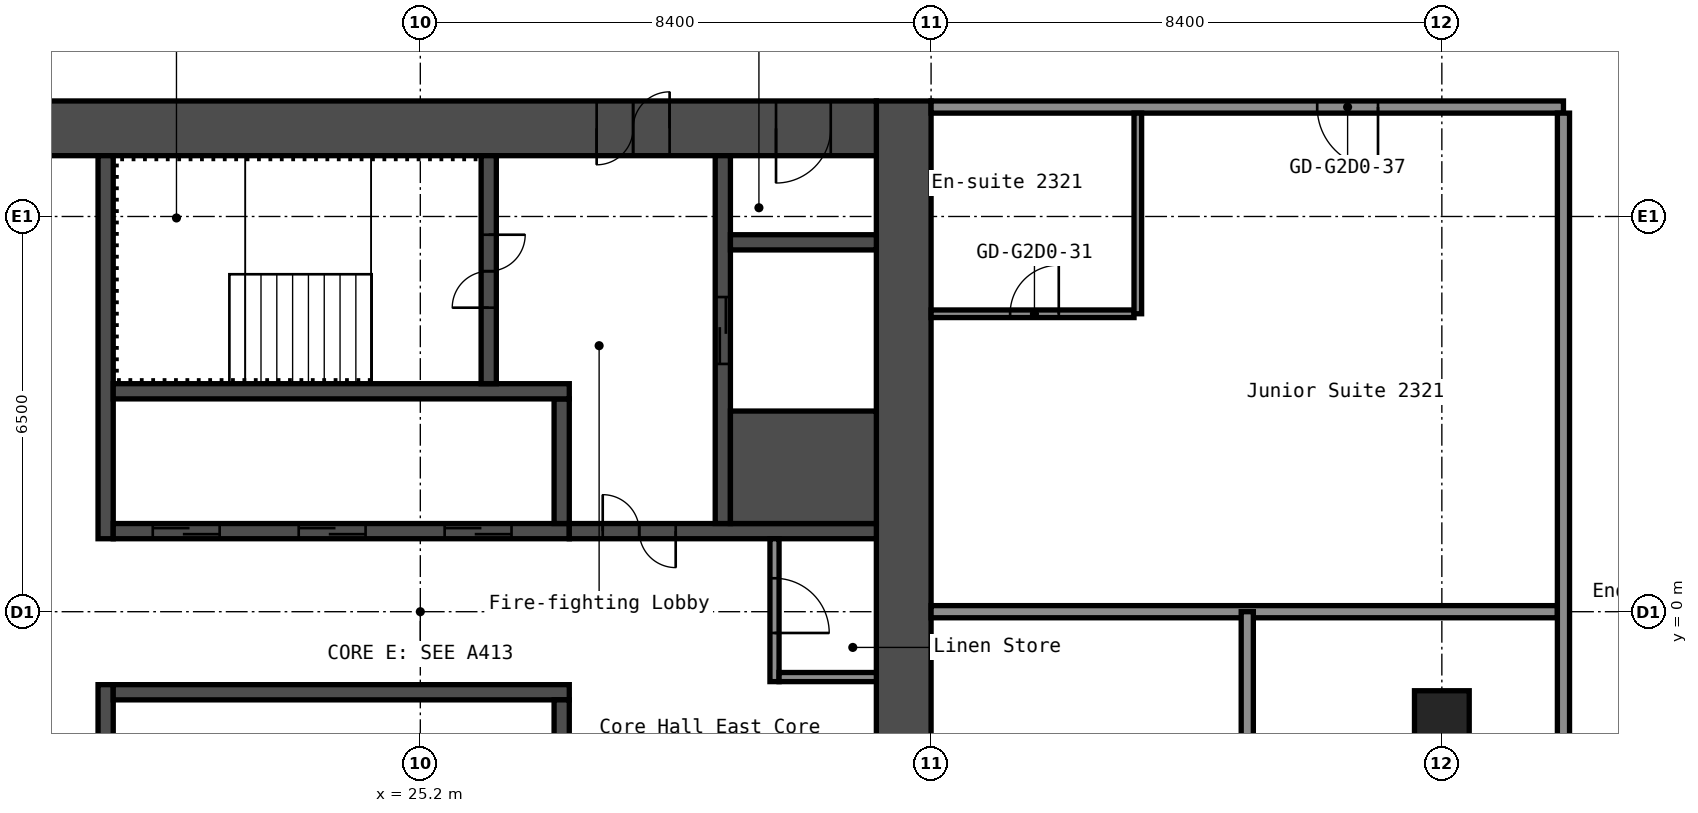
"""IFC4 building model, lengths in metres.
Left out: names, types, materials, properties, quantities, classifications, styles, units other than length and angle.
Written with IfcOpenShell. Run it as: python <this file> out.ifc"""

import sys

from ifc_helpers import new_model, si_unit, direction, frame, frame_2d, origin, origin_2d, place, context, subcontext, project, spatial, rectangle, hollow_rectangle, extrude, element, fill, save


model = new_model("IFC4")
c1 = context("Model", 3, precision=1e-05, world=origin(), true_north=direction((0.0, 1.0)))
c2 = subcontext(c1, "Body", "Model", "MODEL_VIEW")
j1 = project(units=[si_unit("LENGTHUNIT", "METRE"), si_unit("PLANEANGLEUNIT", "RADIAN")], contexts=[c1])
p1 = place(None, origin())
s1 = spatial("IfcSite", under=j1, at=p1, CompositionType="ELEMENT")
p2 = place(p1, origin())
s2 = spatial("IfcBuilding", under=s1, at=p2, CompositionType="ELEMENT")
p3 = place(p2, frame((0.0, 0.0, 85.0)))
s3 = spatial("IfcBuildingStorey", under=s2, at=p3, CompositionType="ELEMENT", Elevation=85.0)
p4 = place(p3, frame((42.0, -1.75, 0.0), z_axis=(0.0, 0.0, 1.0), x_axis=(1.0, 0.0, 0.0)))
e1 = element("IfcColumn", 1, at=p4, inside=s3, PredefinedType="COLUMN", context=c2, shape_type="SweptSolid", body=[
    extrude(hollow_rectangle(XDim=0.9, YDim=0.9, WallThickness=0.036, at=origin_2d()), origin(), (0.0, 0.0, 1.0), 2.8),
])
p5 = place(p3, frame((33.15, -8.4, 0.0), z_axis=(0.0, 0.0, 1.0), x_axis=(0.0, 1.0, 0.0)))
e2 = element("IfcWall", 2, at=p5, inside=s3, PredefinedType="SHEAR", context=c2, shape_type="SweptSolid", body=[
    extrude(rectangle(XDim=16.8, YDim=0.9, at=frame_2d((8.4, 0.0))), origin(), (0.0, 0.0, 1.0), 2.8),
])
p6 = place(p3, frame((17.7, 7.95, 0.0), z_axis=(0.0, 0.0, 1.0), x_axis=(1.0, 0.0, 0.0)))
e3 = element("IfcWall", 3, at=p6, inside=s3, PredefinedType="SHEAR", context=c2, shape_type="SweptSolid", body=[
    extrude(rectangle(XDim=15.0, YDim=0.9, at=frame_2d((7.5, 0.0))), origin(), (0.0, 0.0, 1.0), 2.8),
])
p7 = place(p6, frame((10.4, 0.0, 0.0)))
e4 = element("IfcOpeningElement", 4, at=p7, cuts=e3, PredefinedType="OPENING", context=c2, shape_type="SweptSolid", body=[
    extrude(rectangle(XDim=1.2, YDim=2.1, at=frame_2d((0.6, 1.05))), frame((0.0, 0.46, 0.0), z_axis=(0.0, -1.0, 0.0), x_axis=(1.0, 0.0, 0.0)), (0.0, 0.0, 1.0), 0.92),
])
p8 = place(p6, frame((13.35, 0.0, 0.0)))
e5 = element("IfcOpeningElement", 5, at=p8, cuts=e3, PredefinedType="OPENING", context=c2, shape_type="SweptSolid", body=[
    extrude(rectangle(XDim=0.9, YDim=2.1, at=frame_2d((0.45, 1.05))), frame((0.0, 0.46, 0.0), z_axis=(0.0, -1.0, 0.0), x_axis=(1.0, 0.0, 0.0)), (0.0, 0.0, 1.0), 0.92),
])
p9 = place(p3, frame((20.025, 1.2, 0.0), z_axis=(0.0, 0.0, 1.0), x_axis=(0.0, 1.0, 0.0)))
e6 = element("IfcWall", 6, at=p9, inside=s3, PredefinedType="SHEAR", context=c2, shape_type="SweptSolid", body=[
    extrude(rectangle(XDim=6.3, YDim=0.25, at=frame_2d((3.15, 0.0))), origin(), (0.0, 0.0, 1.0), 2.8),
])
p10 = place(p3, frame((20.025, -7.5, 0.0), z_axis=(0.0, 0.0, 1.0), x_axis=(0.0, 1.0, 0.0)))
e7 = element("IfcWall", 7, at=p10, inside=s3, PredefinedType="SHEAR", context=c2, shape_type="SweptSolid", body=[
    extrude(rectangle(XDim=6.3, YDim=0.25, at=frame_2d((3.15, 0.0))), origin(), (0.0, 0.0, 1.0), 2.8),
])
p11 = place(p10, frame((2.4, 0.0, 0.0)))
e8 = element("IfcOpeningElement", 8, at=p11, cuts=e7, PredefinedType="OPENING", context=c2, shape_type="SweptSolid", body=[
    extrude(rectangle(XDim=1.0, YDim=2.1, at=frame_2d((0.5, 1.05))), frame((0.0, 0.135, 0.0), z_axis=(0.0, -1.0, 0.0), x_axis=(1.0, 0.0, 0.0)), (0.0, 0.0, 1.0), 0.27),
])
p12 = place(p3, frame((20.15, 1.325, 0.0), z_axis=(0.0, 0.0, 1.0), x_axis=(1.0, 0.0, 0.0)))
e9 = element("IfcWall", 9, at=p12, inside=s3, PredefinedType="SHEAR", context=c2, shape_type="SweptSolid", body=[
    extrude(rectangle(XDim=7.5, YDim=0.25, at=frame_2d((3.75, 0.0))), origin(), (0.0, 0.0, 1.0), 2.8),
])
p13 = place(p12, frame((0.65, 0.0, 0.0)))
e10 = element("IfcOpeningElement", 10, at=p13, cuts=e9, PredefinedType="OPENING", context=c2, shape_type="SweptSolid", body=[
    extrude(rectangle(XDim=1.1, YDim=2.1, at=frame_2d((0.55, 1.05))), frame((0.0, 0.135, 0.0), z_axis=(0.0, -1.0, 0.0), x_axis=(1.0, 0.0, 0.0)), (0.0, 0.0, 1.0), 0.27),
])
p14 = place(p12, frame((3.05, 0.0, 0.0)))
e11 = element("IfcOpeningElement", 11, at=p14, cuts=e9, PredefinedType="OPENING", context=c2, shape_type="SweptSolid", body=[
    extrude(rectangle(XDim=1.1, YDim=2.1, at=frame_2d((0.55, 1.05))), frame((0.0, 0.135, 0.0), z_axis=(0.0, -1.0, 0.0), x_axis=(1.0, 0.0, 0.0)), (0.0, 0.0, 1.0), 0.27),
])
p15 = place(p12, frame((5.45, 0.0, 0.0)))
e12 = element("IfcOpeningElement", 12, at=p15, cuts=e9, PredefinedType="OPENING", context=c2, shape_type="SweptSolid", body=[
    extrude(rectangle(XDim=1.1, YDim=2.1, at=frame_2d((0.55, 1.05))), frame((0.0, 0.135, 0.0), z_axis=(0.0, -1.0, 0.0), x_axis=(1.0, 0.0, 0.0)), (0.0, 0.0, 1.0), 0.27),
])
p16 = place(p3, frame((27.525, 1.45, 0.0), z_axis=(0.0, 0.0, 1.0), x_axis=(0.0, 1.0, 0.0)))
e13 = element("IfcWall", 13, at=p16, inside=s3, PredefinedType="SHEAR", context=c2, shape_type="SweptSolid", body=[
    extrude(rectangle(XDim=2.05, YDim=0.25, at=frame_2d((1.025, 0.0))), origin(), (0.0, 0.0, 1.0), 2.8),
])
p17 = place(p3, frame((20.15, 3.625, 0.0), z_axis=(0.0, 0.0, 1.0), x_axis=(1.0, 0.0, 0.0)))
e14 = element("IfcWall", 14, at=p17, inside=s3, PredefinedType="SHEAR", context=c2, shape_type="SweptSolid", body=[
    extrude(rectangle(XDim=7.5, YDim=0.25, at=frame_2d((3.75, 0.0))), origin(), (0.0, 0.0, 1.0), 2.8),
])
p18 = place(p3, frame((26.325, 3.75, 0.0), z_axis=(0.0, 0.0, 1.0), x_axis=(0.0, 1.0, 0.0)))
e15 = element("IfcWall", 15, at=p18, inside=s3, PredefinedType="SHEAR", context=c2, shape_type="SweptSolid", body=[
    extrude(rectangle(XDim=3.75, YDim=0.25, at=frame_2d((1.875, 0.0))), origin(), (0.0, 0.0, 1.0), 2.8),
])
p19 = place(p18, frame((1.25, 0.0, 0.0)))
e16 = element("IfcOpeningElement", 16, at=p19, cuts=e15, PredefinedType="OPENING", context=c2, shape_type="SweptSolid", body=[
    extrude(rectangle(XDim=1.2, YDim=2.1, at=frame_2d((0.6, 1.05))), frame((0.0, 0.135, 0.0), z_axis=(0.0, -1.0, 0.0), x_axis=(1.0, 0.0, 0.0)), (0.0, 0.0, 1.0), 0.27),
])
p20 = place(p3, frame((27.65, 1.325, 0.0), z_axis=(0.0, 0.0, 1.0), x_axis=(1.0, 0.0, 0.0)))
e17 = element("IfcWall", 17, at=p20, inside=s3, PredefinedType="SHEAR", context=c2, shape_type="SweptSolid", body=[
    extrude(rectangle(XDim=5.05, YDim=0.25, at=frame_2d((2.525, 0.0))), origin(), (0.0, 0.0, 1.0), 2.8),
])
p21 = place(p20, frame((0.55, 0.0, 0.0)))
e18 = element("IfcOpeningElement", 18, at=p21, cuts=e17, PredefinedType="OPENING", context=c2, shape_type="SweptSolid", body=[
    extrude(rectangle(XDim=1.2, YDim=2.1, at=frame_2d((0.6, 1.05))), frame((0.0, 0.135, 0.0), z_axis=(0.0, -1.0, 0.0), x_axis=(1.0, 0.0, 0.0)), (0.0, 0.0, 1.0), 0.27),
])
p22 = place(p3, frame((30.175, 1.45, 0.0), z_axis=(0.0, 0.0, 1.0), x_axis=(0.0, 1.0, 0.0)))
e19 = element("IfcWall", 19, at=p22, inside=s3, PredefinedType="SHEAR", context=c2, shape_type="SweptSolid", body=[
    extrude(rectangle(XDim=6.05, YDim=0.25, at=frame_2d((3.025, 0.0))), origin(), (0.0, 0.0, 1.0), 2.8),
])
p23 = place(p22, frame((2.625, 0.0, 0.0)))
e20 = element("IfcOpeningElement", 20, at=p23, cuts=e19, PredefinedType="OPENING", context=c2, shape_type="SweptSolid", body=[
    extrude(rectangle(XDim=1.1, YDim=2.1, at=frame_2d((0.55, 1.05))), frame((0.0, 0.135, 0.0), z_axis=(0.0, -1.0, 0.0), x_axis=(1.0, 0.0, 0.0)), (0.0, 0.0, 1.0), 0.27),
])
p24 = place(p3, frame((30.3, 2.375, 0.0), z_axis=(0.0, 0.0, 1.0), x_axis=(1.0, 0.0, 0.0)))
e21 = element("IfcWall", 21, at=p24, inside=s3, PredefinedType="SHEAR", context=c2, shape_type="SweptSolid", body=[
    extrude(rectangle(XDim=2.4, YDim=1.85, at=frame_2d((1.2, 0.0))), origin(), (0.0, 0.0, 1.0), 2.8),
])
p25 = place(p3, frame((30.3, 6.075, 0.0), z_axis=(0.0, 0.0, 1.0), x_axis=(1.0, 0.0, 0.0)))
e22 = element("IfcWall", 22, at=p25, inside=s3, PredefinedType="SHEAR", context=c2, shape_type="SweptSolid", body=[
    extrude(rectangle(XDim=2.4, YDim=0.25, at=frame_2d((1.2, 0.0))), origin(), (0.0, 0.0, 1.0), 2.8),
])
p26 = place(p3, frame((20.15, -1.325, 0.0), z_axis=(0.0, 0.0, 1.0), x_axis=(1.0, 0.0, 0.0)))
e23 = element("IfcWall", 23, at=p26, inside=s3, PredefinedType="SHEAR", context=c2, shape_type="SweptSolid", body=[
    extrude(rectangle(XDim=7.5, YDim=0.25, at=frame_2d((3.75, 0.0))), origin(), (0.0, 0.0, 1.0), 2.8),
])
p27 = place(p3, frame((27.525, -3.5, 0.0), z_axis=(0.0, 0.0, 1.0), x_axis=(0.0, 1.0, 0.0)))
e24 = element("IfcWall", 24, at=p27, inside=s3, PredefinedType="SHEAR", context=c2, shape_type="SweptSolid", body=[
    extrude(rectangle(XDim=2.05, YDim=0.25, at=frame_2d((1.025, 0.0))), origin(), (0.0, 0.0, 1.0), 2.8),
])
p28 = place(p3, frame((31.025, -1.15, 0.0), z_axis=(0.0, 0.0, 1.0), x_axis=(0.0, 1.0, 0.0)))
e25 = element("IfcWall", 25, at=p28, inside=s3, PredefinedType="PARTITIONING", context=c2, shape_type="SweptSolid", body=[
    extrude(rectangle(XDim=2.35, YDim=0.15, at=frame_2d((1.175, 0.0))), origin(), (0.0, 0.0, 1.0), 2.8),
])
p29 = place(p28, frame((0.8, 0.0, 0.0)))
e26 = element("IfcOpeningElement", 26, at=p29, cuts=e25, PredefinedType="OPENING", context=c2, shape_type="SweptSolid", body=[
    extrude(rectangle(XDim=0.9, YDim=2.1, at=frame_2d((0.45, 1.05))), frame((0.0, 0.085, 0.0), z_axis=(0.0, -1.0, 0.0), x_axis=(1.0, 0.0, 0.0)), (0.0, 0.0, 1.0), 0.17),
])
p30 = place(p3, frame((31.1, -1.075, 0.0), z_axis=(0.0, 0.0, 1.0), x_axis=(1.0, 0.0, 0.0)))
e27 = element("IfcWall", 27, at=p30, inside=s3, PredefinedType="PARTITIONING", context=c2, shape_type="SweptSolid", body=[
    extrude(rectangle(XDim=1.6, YDim=0.15, at=frame_2d((0.8, 0.0))), origin(), (0.0, 0.0, 1.0), 2.8),
])
p31 = place(p3, frame((33.6, 0.0, 0.0), z_axis=(0.0, 0.0, 1.0), x_axis=(1.0, 0.0, 0.0)))
e28 = element("IfcWall", 28, at=p31, inside=s3, PredefinedType="PARTITIONING", context=c2, shape_type="SweptSolid", body=[
    extrude(rectangle(XDim=10.3, YDim=0.2, at=frame_2d((5.15, 0.0))), origin(), (0.0, 0.0, 1.0), 2.8),
])
p32 = place(p3, frame((33.6, 4.9, 0.0), z_axis=(0.0, 0.0, 1.0), x_axis=(1.0, 0.0, 0.0)))
e29 = element("IfcWall", 29, at=p32, inside=s3, PredefinedType="PARTITIONING", context=c2, shape_type="SweptSolid", body=[
    extrude(rectangle(XDim=3.337, YDim=0.125, at=frame_2d((1.669, 0.0))), origin(), (0.0, 0.0, 1.0), 2.8),
])
p33 = place(p32, frame((1.3, 0.0, 0.0)))
e30 = element("IfcOpeningElement", 30, at=p33, cuts=e29, PredefinedType="OPENING", context=c2, shape_type="SweptSolid", body=[
    extrude(rectangle(XDim=0.8, YDim=2.1, at=frame_2d((0.4, 1.05))), frame((0.0, 0.073, 0.0), z_axis=(0.0, -1.0, 0.0), x_axis=(1.0, 0.0, 0.0)), (0.0, 0.0, 1.0), 0.145),
])
p34 = place(p3, frame((33.6, 8.3, 0.0), z_axis=(0.0, 0.0, 1.0), x_axis=(1.0, 0.0, 0.0)))
e31 = element("IfcWall", 31, at=p34, inside=s3, PredefinedType="PARTITIONING", context=c2, shape_type="SweptSolid", body=[
    extrude(rectangle(XDim=10.4, YDim=0.2, at=frame_2d((5.2, 0.0))), origin(), (0.0, 0.0, 1.0), 2.8),
])
p35 = place(p34, frame((6.35, 0.0, 0.0)))
e32 = element("IfcOpeningElement", 32, at=p35, cuts=e31, PredefinedType="OPENING", context=c2, shape_type="SweptSolid", body=[
    extrude(rectangle(XDim=1.0, YDim=2.1, at=frame_2d((0.5, 1.05))), frame((0.0, 0.11, 0.0), z_axis=(0.0, -1.0, 0.0), x_axis=(1.0, 0.0, 0.0)), (0.0, 0.0, 1.0), 0.22),
])
p36 = place(p3, frame((37.0, 4.9, 0.0), z_axis=(0.0, 0.0, 1.0), x_axis=(0.0, 1.0, 0.0)))
e33 = element("IfcWall", 33, at=p36, inside=s3, PredefinedType="PARTITIONING", context=c2, shape_type="SweptSolid", body=[
    extrude(rectangle(XDim=3.3, YDim=0.125, at=frame_2d((1.65, 0.0))), origin(), (0.0, 0.0, 1.0), 2.8),
])
p37 = place(p3, frame((38.8, -8.2, 0.0), z_axis=(0.0, 0.0, 1.0), x_axis=(0.0, 1.0, 0.0)))
e34 = element("IfcWall", 34, at=p37, inside=s3, PredefinedType="PARTITIONING", context=c2, shape_type="SweptSolid", body=[
    extrude(rectangle(XDim=8.2, YDim=0.2, at=frame_2d((4.1, 0.0))), origin(), (0.0, 0.0, 1.0), 2.8),
])
p38 = place(p3, frame((44.0, -8.2, 0.0), z_axis=(0.0, 0.0, 1.0), x_axis=(0.0, 1.0, 0.0)))
e35 = element("IfcWall", 35, at=p38, inside=s3, PredefinedType="PARTITIONING", context=c2, shape_type="SweptSolid", body=[
    extrude(rectangle(XDim=16.4, YDim=0.2, at=frame_2d((8.2, 0.0))), origin(), (0.0, 0.0, 1.0), 2.8),
])
p39 = place(p7, origin())
e36 = element("IfcDoor", 36, at=p39, inside=s3, OperationType="DOUBLE_DOOR_SINGLE_SWING", PredefinedType="DOOR", context=c2, shape_type="SweptSolid", body=[
    extrude(rectangle(XDim=1.2, YDim=2.1, at=frame_2d((0.6, 1.05))), frame((0.0, 0.025, 0.0), z_axis=(0.0, -1.0, 0.0), x_axis=(1.0, 0.0, 0.0)), (0.0, 0.0, 1.0), 0.05),
])
fill(e4, e36)
p40 = place(p8, origin())
e37 = element("IfcDoor", 37, at=p40, inside=s3, OperationType="SINGLE_SWING_LEFT", PredefinedType="DOOR", context=c2, shape_type="SweptSolid", body=[
    extrude(rectangle(XDim=0.9, YDim=2.1, at=frame_2d((0.45, 1.05))), frame((0.0, 0.025, 0.0), z_axis=(0.0, -1.0, 0.0), x_axis=(1.0, 0.0, 0.0)), (0.0, 0.0, 1.0), 0.05),
])
fill(e5, e37)
p41 = place(p19, origin())
e38 = element("IfcDoor", 38, at=p41, inside=s3, OperationType="DOUBLE_DOOR_SINGLE_SWING", PredefinedType="DOOR", context=c2, shape_type="SweptSolid", body=[
    extrude(rectangle(XDim=1.2, YDim=2.1, at=frame_2d((0.6, 1.05))), frame((0.0, 0.025, 0.0), z_axis=(0.0, -1.0, 0.0), x_axis=(1.0, 0.0, 0.0)), (0.0, 0.0, 1.0), 0.05),
])
fill(e16, e38)
p42 = place(p21, origin())
e39 = element("IfcDoor", 39, at=p42, inside=s3, OperationType="DOUBLE_DOOR_SINGLE_SWING", PredefinedType="DOOR", context=c2, shape_type="SweptSolid", body=[
    extrude(rectangle(XDim=1.2, YDim=2.1, at=frame_2d((0.6, 1.05))), frame((0.0, 0.025, 0.0), z_axis=(0.0, -1.0, 0.0), x_axis=(1.0, 0.0, 0.0)), (0.0, 0.0, 1.0), 0.05),
])
fill(e18, e39)
p43 = place(p29, origin())
e40 = element("IfcDoor", 40, at=p43, inside=s3, OperationType="SINGLE_SWING_LEFT", PredefinedType="DOOR", context=c2, shape_type="SweptSolid", body=[
    extrude(rectangle(XDim=0.9, YDim=2.1, at=frame_2d((0.45, 1.05))), frame((0.0, 0.025, 0.0), z_axis=(0.0, -1.0, 0.0), x_axis=(1.0, 0.0, 0.0)), (0.0, 0.0, 1.0), 0.05),
])
fill(e26, e40)
p44 = place(p13, origin())
e41 = element("IfcDoor", 41, at=p44, inside=s3, OperationType="DOUBLE_DOOR_SLIDING", PredefinedType="DOOR", context=c2, shape_type="SweptSolid", body=[
    extrude(rectangle(XDim=1.1, YDim=2.1, at=frame_2d((0.55, 1.05))), frame((0.0, 0.025, 0.0), z_axis=(0.0, -1.0, 0.0), x_axis=(1.0, 0.0, 0.0)), (0.0, 0.0, 1.0), 0.05),
])
fill(e10, e41)
p45 = place(p14, origin())
e42 = element("IfcDoor", 42, at=p45, inside=s3, OperationType="DOUBLE_DOOR_SLIDING", PredefinedType="DOOR", context=c2, shape_type="SweptSolid", body=[
    extrude(rectangle(XDim=1.1, YDim=2.1, at=frame_2d((0.55, 1.05))), frame((0.0, 0.025, 0.0), z_axis=(0.0, -1.0, 0.0), x_axis=(1.0, 0.0, 0.0)), (0.0, 0.0, 1.0), 0.05),
])
fill(e11, e42)
p46 = place(p15, origin())
e43 = element("IfcDoor", 43, at=p46, inside=s3, OperationType="DOUBLE_DOOR_SLIDING", PredefinedType="DOOR", context=c2, shape_type="SweptSolid", body=[
    extrude(rectangle(XDim=1.1, YDim=2.1, at=frame_2d((0.55, 1.05))), frame((0.0, 0.025, 0.0), z_axis=(0.0, -1.0, 0.0), x_axis=(1.0, 0.0, 0.0)), (0.0, 0.0, 1.0), 0.05),
])
fill(e12, e43)
p47 = place(p23, origin())
e44 = element("IfcDoor", 44, at=p47, inside=s3, OperationType="DOUBLE_DOOR_SLIDING", PredefinedType="DOOR", context=c2, shape_type="SweptSolid", body=[
    extrude(rectangle(XDim=1.1, YDim=2.1, at=frame_2d((0.55, 1.05))), frame((0.0, 0.025, 0.0), z_axis=(0.0, -1.0, 0.0), x_axis=(1.0, 0.0, 0.0)), (0.0, 0.0, 1.0), 0.05),
])
fill(e20, e44)
p48 = place(p33, origin())
e45 = element("IfcDoor", 45, at=p48, inside=s3, OperationType="SINGLE_SWING_LEFT", PredefinedType="DOOR", context=c2, shape_type="SweptSolid", body=[
    extrude(rectangle(XDim=0.8, YDim=2.1, at=frame_2d((0.4, 1.05))), frame((0.0, 0.025, 0.0), z_axis=(0.0, -1.0, 0.0), x_axis=(1.0, 0.0, 0.0)), (0.0, 0.0, 1.0), 0.05),
])
fill(e30, e45)
p49 = place(p35, origin())
e46 = element("IfcDoor", 46, at=p49, inside=s3, OperationType="SINGLE_SWING_RIGHT", PredefinedType="DOOR", context=c2, shape_type="SweptSolid", body=[
    extrude(rectangle(XDim=1.0, YDim=2.1, at=frame_2d((0.5, 1.05))), frame((0.0, 0.025, 0.0), z_axis=(0.0, -1.0, 0.0), x_axis=(1.0, 0.0, 0.0)), (0.0, 0.0, 1.0), 0.05),
])
fill(e32, e46)
save(model, sys.argv[1])
